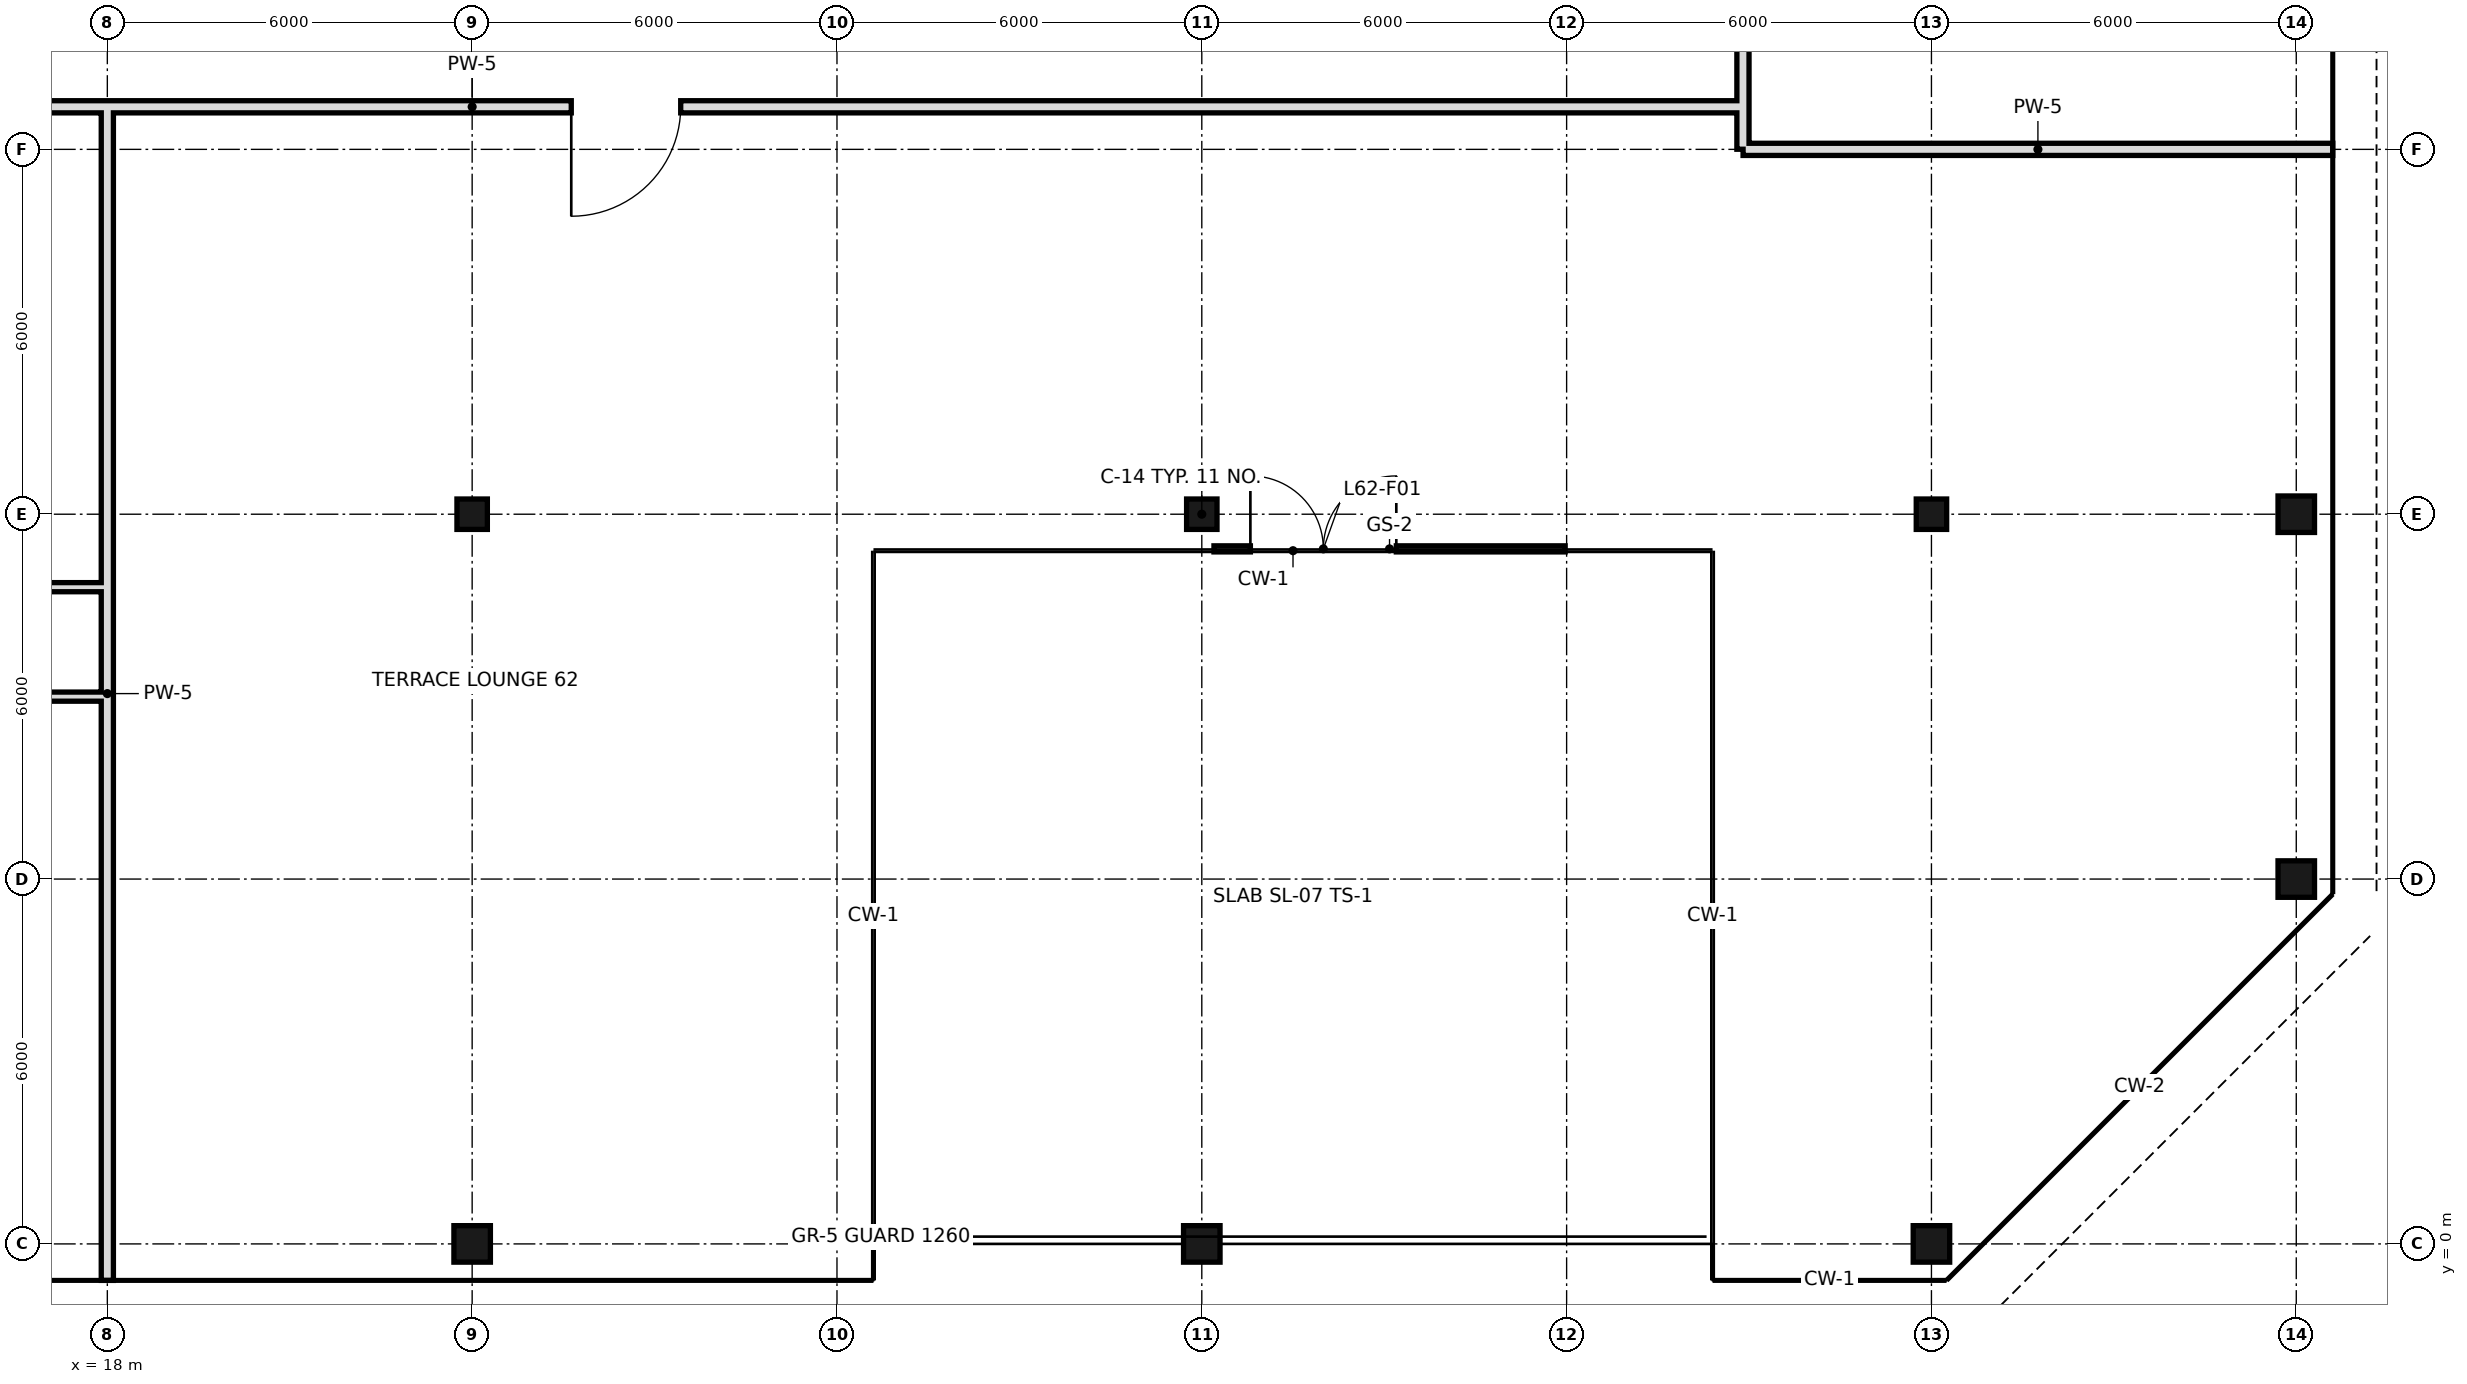
"""IFC4 building model, lengths in metres.
Left out: names, types, materials, properties, quantities, classifications, styles, units other than length and angle.
Written with IfcOpenShell. Run it as: python <this file> out.ifc"""

import sys

from ifc_helpers import new_model, si_unit, direction, frame, frame_2d, origin, origin_2d, place, context, subcontext, project, spatial, rectangle, hollow_rectangle, extrude, element, fill, save


model = new_model("IFC4")
c1 = context("Model", 3, precision=1e-05, world=origin(), true_north=direction((0.0, 1.0)))
c2 = subcontext(c1, "Body", "Model", "MODEL_VIEW")
j1 = project(units=[si_unit("LENGTHUNIT", "METRE"), si_unit("PLANEANGLEUNIT", "RADIAN")], contexts=[c1])
p1 = place(None, origin())
s1 = spatial("IfcSite", under=j1, at=p1, CompositionType="ELEMENT")
p2 = place(p1, origin())
s2 = spatial("IfcBuilding", under=s1, at=p2, CompositionType="ELEMENT")
p3 = place(p2, frame((0.0, 0.0, 263.0)))
s3 = spatial("IfcBuildingStorey", under=s2, at=p3, CompositionType="ELEMENT", Elevation=263.0)
p4 = place(p3, frame((24.0, 0.0, 0.0), z_axis=(0.0, 0.0, 1.0), x_axis=(1.0, 0.0, 0.0)))
e1 = element("IfcColumn", 1, at=p4, inside=s3, PredefinedType="COLUMN", context=c2, shape_type="SweptSolid", body=[
    extrude(hollow_rectangle(XDim=0.6, YDim=0.6, WallThickness=0.028, at=origin_2d()), origin(), (0.0, 0.0, 1.0), 3.6),
])
p5 = place(p3, frame((24.0, 12.0, 0.0), z_axis=(0.0, 0.0, 1.0), x_axis=(1.0, 0.0, 0.0)))
e2 = element("IfcColumn", 2, at=p5, inside=s3, PredefinedType="COLUMN", context=c2, shape_type="SweptSolid", body=[
    extrude(hollow_rectangle(XDim=0.5, YDim=0.5, WallThickness=0.025, at=origin_2d()), origin(), (0.0, 0.0, 1.0), 3.6),
])
p6 = place(p3, frame((36.0, 0.0, 0.0), z_axis=(0.0, 0.0, 1.0), x_axis=(1.0, 0.0, 0.0)))
e3 = element("IfcColumn", 3, at=p6, inside=s3, PredefinedType="COLUMN", context=c2, shape_type="SweptSolid", body=[
    extrude(hollow_rectangle(XDim=0.6, YDim=0.6, WallThickness=0.028, at=origin_2d()), origin(), (0.0, 0.0, 1.0), 3.6),
])
p7 = place(p3, frame((36.0, 12.0, 0.0), z_axis=(0.0, 0.0, 1.0), x_axis=(1.0, 0.0, 0.0)))
e4 = element("IfcColumn", 4, at=p7, inside=s3, PredefinedType="COLUMN", context=c2, shape_type="SweptSolid", body=[
    extrude(hollow_rectangle(XDim=0.5, YDim=0.5, WallThickness=0.025, at=origin_2d()), origin(), (0.0, 0.0, 1.0), 3.6),
])
p8 = place(p3, frame((48.0, 0.0, 0.0), z_axis=(0.0, 0.0, 1.0), x_axis=(1.0, 0.0, 0.0)))
e5 = element("IfcColumn", 5, at=p8, inside=s3, PredefinedType="COLUMN", context=c2, shape_type="SweptSolid", body=[
    extrude(hollow_rectangle(XDim=0.6, YDim=0.6, WallThickness=0.028, at=origin_2d()), origin(), (0.0, 0.0, 1.0), 3.6),
])
p9 = place(p3, frame((48.0, 12.0, 0.0), z_axis=(0.0, 0.0, 1.0), x_axis=(1.0, 0.0, 0.0)))
e6 = element("IfcColumn", 6, at=p9, inside=s3, PredefinedType="COLUMN", context=c2, shape_type="SweptSolid", body=[
    extrude(hollow_rectangle(XDim=0.5, YDim=0.5, WallThickness=0.025, at=origin_2d()), origin(), (0.0, 0.0, 1.0), 3.6),
])
for number, where, z_axis, x_axis in (
    (7, (54.0, 6.0, 0.0), (0.0, 0.0, 1.0), (1.0, 0.0, 0.0)),
    (8, (54.0, 12.0, 0.0), (0.0, 0.0, 1.0), (1.0, 0.0, 0.0)),
):
    element("IfcColumn", number, at=place(p3, frame(where, z_axis=z_axis, x_axis=x_axis)), inside=s3, PredefinedType="COLUMN", context=c2, shape_type="SweptSolid", body=[
        extrude(hollow_rectangle(XDim=0.6, YDim=0.6, WallThickness=0.028, at=origin_2d()), origin(), (0.0, 0.0, 1.0), 3.6),
    ])
p10 = place(p3, frame((36.2, 11.43, 0.0), z_axis=(0.0, 0.0, 1.0), x_axis=(1.0, 0.0, 0.0)))
e9 = element("IfcWall", 9, at=p10, inside=s3, PredefinedType="SOLIDWALL", context=c2, shape_type="SweptSolid", body=[
    extrude(rectangle(XDim=5.775, YDim=0.1, at=frame_2d((2.888, 0.0))), origin(), (0.0, 0.0, 1.0), 3.42),
])
p11 = place(p10, frame((0.599, 0.0, 0.0)))
e10 = element("IfcOpeningElement", 10, at=p11, cuts=e9, PredefinedType="OPENING", context=c2, shape_type="SweptSolid", body=[
    extrude(rectangle(XDim=2.4, YDim=2.4, at=frame_2d((1.2, 1.2))), frame((0.0, 0.06, 0.0), z_axis=(0.0, -1.0, 0.0), x_axis=(1.0, 0.0, 0.0)), (0.0, 0.0, 1.0), 0.12),
])
p12 = place(p3, frame((18.0, -0.6, 0.0), z_axis=(0.0, 0.0, 1.0), x_axis=(0.0, 1.0, 0.0)))
e11 = element("IfcWall", 11, at=p12, inside=s3, PredefinedType="SOLIDWALL", context=c2, shape_type="SweptSolid", body=[
    extrude(rectangle(XDim=19.3, YDim=0.2, at=frame_2d((9.65, 0.0))), origin(), (0.0, 0.0, 1.0), 2.72),
])
p13 = place(p3, frame((44.9, 18.002, 0.0), z_axis=(0.0, 0.0, 1.0), x_axis=(0.0, 1.0, 0.0)))
e12 = element("IfcWall", 12, at=p13, inside=s3, PredefinedType="SOLIDWALL", context=c2, shape_type="SweptSolid", body=[
    extrude(rectangle(XDim=30.598, YDim=0.2, at=frame_2d((15.299, 0.0))), origin(), (0.0, 0.0, 1.0), 2.72),
])
p14 = place(p13, frame((9.23, 0.0, 0.0)))
e13 = element("IfcOpeningElement", 13, at=p14, cuts=e12, PredefinedType="OPENING", context=c2, shape_type="SweptSolid", body=[
    extrude(rectangle(XDim=1.2, YDim=2.4, at=frame_2d((0.6, 1.2))), frame((0.0, 0.11, 0.0), z_axis=(0.0, -1.0, 0.0), x_axis=(1.0, 0.0, 0.0)), (0.0, 0.0, 1.0), 0.22),
])
p15 = place(p3, frame((-4.8, 10.8, 0.0), z_axis=(0.0, 0.0, 1.0), x_axis=(1.0, 0.0, 0.0)))
e14 = element("IfcWall", 14, at=p15, inside=s3, PredefinedType="PARTITIONING", context=c2, shape_type="SweptSolid", body=[
    extrude(rectangle(XDim=22.8, YDim=0.15, at=frame_2d((11.4, 0.0))), origin(), (0.0, 0.0, 1.0), 3.42),
])
p16 = place(p15, frame((15.4, 0.0, 0.0)))
e15 = element("IfcOpeningElement", 15, at=p16, cuts=e14, PredefinedType="OPENING", context=c2, shape_type="SweptSolid", body=[
    extrude(rectangle(XDim=1.0, YDim=2.4, at=frame_2d((0.5, 1.2))), frame((0.0, 0.085, 0.0), z_axis=(0.0, -1.0, 0.0), x_axis=(1.0, 0.0, 0.0)), (0.0, 0.0, 1.0), 0.17),
])
p17 = place(p15, frame((5.5, 0.0, 0.0)))
e16 = element("IfcOpeningElement", 16, at=p17, cuts=e14, PredefinedType="OPENING", context=c2, shape_type="SweptSolid", body=[
    extrude(rectangle(XDim=1.0, YDim=2.4, at=frame_2d((0.5, 1.2))), frame((0.0, 0.085, 0.0), z_axis=(0.0, -1.0, 0.0), x_axis=(1.0, 0.0, 0.0)), (0.0, 0.0, 1.0), 0.17),
])
p18 = place(p15, frame((20.56, 0.0, 0.0)))
e17 = element("IfcOpeningElement", 17, at=p18, cuts=e14, PredefinedType="OPENING", context=c2, shape_type="SweptSolid", body=[
    extrude(rectangle(XDim=1.0, YDim=2.4, at=frame_2d((0.5, 1.2))), frame((0.0, 0.085, 0.0), z_axis=(0.0, -1.0, 0.0), x_axis=(1.0, 0.0, 0.0)), (0.0, 0.0, 1.0), 0.17),
])
p19 = place(p3, frame((44.902, 18.0, 0.0), z_axis=(0.0, 0.0, 1.0), x_axis=(1.0, 0.0, 0.0)))
e18 = element("IfcWall", 18, at=p19, inside=s3, PredefinedType="SOLIDWALL", context=c2, shape_type="SweptSolid", body=[
    extrude(rectangle(XDim=9.698, YDim=0.2, at=frame_2d((4.849, 0.0))), origin(), (0.0, 0.0, 1.0), 2.72),
])
p20 = place(p3, frame((3.1, 18.7, 0.0), z_axis=(0.0, 0.0, 1.0), x_axis=(1.0, 0.0, 0.0)))
e19 = element("IfcWall", 19, at=p20, inside=s3, PredefinedType="SOLIDWALL", context=c2, shape_type="SweptSolid", body=[
    extrude(rectangle(XDim=41.8, YDim=0.2, at=frame_2d((20.9, 0.0))), origin(), (0.0, 0.0, 1.0), 2.72),
])
p21 = place(p20, frame((5.64, 0.0, 0.0)))
e20 = element("IfcOpeningElement", 20, at=p21, cuts=e19, PredefinedType="OPENING", context=c2, shape_type="SweptSolid", body=[
    extrude(rectangle(XDim=1.2, YDim=2.4, at=frame_2d((0.6, 1.2))), frame((0.0, 0.11, 0.0), z_axis=(0.0, -1.0, 0.0), x_axis=(1.0, 0.0, 0.0)), (0.0, 0.0, 1.0), 0.22),
])
p22 = place(p20, frame((22.53, 0.0, 0.0)))
e21 = element("IfcOpeningElement", 21, at=p22, cuts=e19, PredefinedType="OPENING", context=c2, shape_type="SweptSolid", body=[
    extrude(rectangle(XDim=1.8, YDim=2.4, at=frame_2d((0.9, 1.2))), frame((0.0, 0.11, 0.0), z_axis=(0.0, -1.0, 0.0), x_axis=(1.0, 0.0, 0.0)), (0.0, 0.0, 1.0), 0.22),
])
p23 = place(p3, frame((-3.6, 9.0, 0.0), z_axis=(0.0, 0.0, 1.0), x_axis=(1.0, 0.0, 0.0)))
e22 = element("IfcWall", 22, at=p23, inside=s3, PredefinedType="PARTITIONING", context=c2, shape_type="SweptSolid", body=[
    extrude(rectangle(XDim=21.6, YDim=0.15, at=frame_2d((10.8, 0.0))), origin(), (0.0, 0.0, 1.0), 3.42),
])
p24 = place(p23, frame((1.72, 0.0, 0.0)))
e23 = element("IfcOpeningElement", 23, at=p24, cuts=e22, PredefinedType="OPENING", context=c2, shape_type="SweptSolid", body=[
    extrude(rectangle(XDim=1.0, YDim=2.4, at=frame_2d((0.5, 1.2))), frame((0.0, 0.085, 0.0), z_axis=(0.0, -1.0, 0.0), x_axis=(1.0, 0.0, 0.0)), (0.0, 0.0, 1.0), 0.17),
])
p25 = place(p23, frame((6.76, 0.0, 0.0)))
e24 = element("IfcOpeningElement", 24, at=p25, cuts=e22, PredefinedType="OPENING", context=c2, shape_type="SweptSolid", body=[
    extrude(rectangle(XDim=1.8, YDim=2.4, at=frame_2d((0.9, 1.2))), frame((0.0, 0.085, 0.0), z_axis=(0.0, -1.0, 0.0), x_axis=(1.0, 0.0, 0.0)), (0.0, 0.0, 1.0), 0.17),
])
p26 = place(p23, frame((18.44, 0.0, 0.0)))
e25 = element("IfcOpeningElement", 25, at=p26, cuts=e22, PredefinedType="OPENING", context=c2, shape_type="SweptSolid", body=[
    extrude(rectangle(XDim=1.8, YDim=2.4, at=frame_2d((0.9, 1.2))), frame((0.0, 0.085, 0.0), z_axis=(0.0, -1.0, 0.0), x_axis=(1.0, 0.0, 0.0)), (0.0, 0.0, 1.0), 0.17),
])
p27 = place(p11, origin())
e26 = element("IfcDoor", 26, at=p27, inside=s3, OperationType="DOUBLE_DOOR_SINGLE_SWING", PredefinedType="DOOR", context=c2, shape_type="SweptSolid", body=[
    extrude(rectangle(XDim=2.4, YDim=2.4, at=frame_2d((1.2, 1.2))), frame((0.0, 0.025, 0.0), z_axis=(0.0, -1.0, 0.0), x_axis=(1.0, 0.0, 0.0)), (0.0, 0.0, 1.0), 0.05),
])
fill(e10, e26)
p28 = place(p22, frame((1.8, 0.0, 0.0), z_axis=(0.0, 0.0, 1.0), x_axis=(-1.0, 0.0, 0.0)))
e27 = element("IfcDoor", 27, at=p28, inside=s3, OperationType="SINGLE_SWING_RIGHT", PredefinedType="DOOR", context=c2, shape_type="SweptSolid", body=[
    extrude(rectangle(XDim=1.8, YDim=2.4, at=frame_2d((0.9, 1.2))), frame((0.0, 0.025, 0.0), z_axis=(0.0, -1.0, 0.0), x_axis=(1.0, 0.0, 0.0)), (0.0, 0.0, 1.0), 0.05),
])
fill(e21, e27)
save(model, sys.argv[1])
